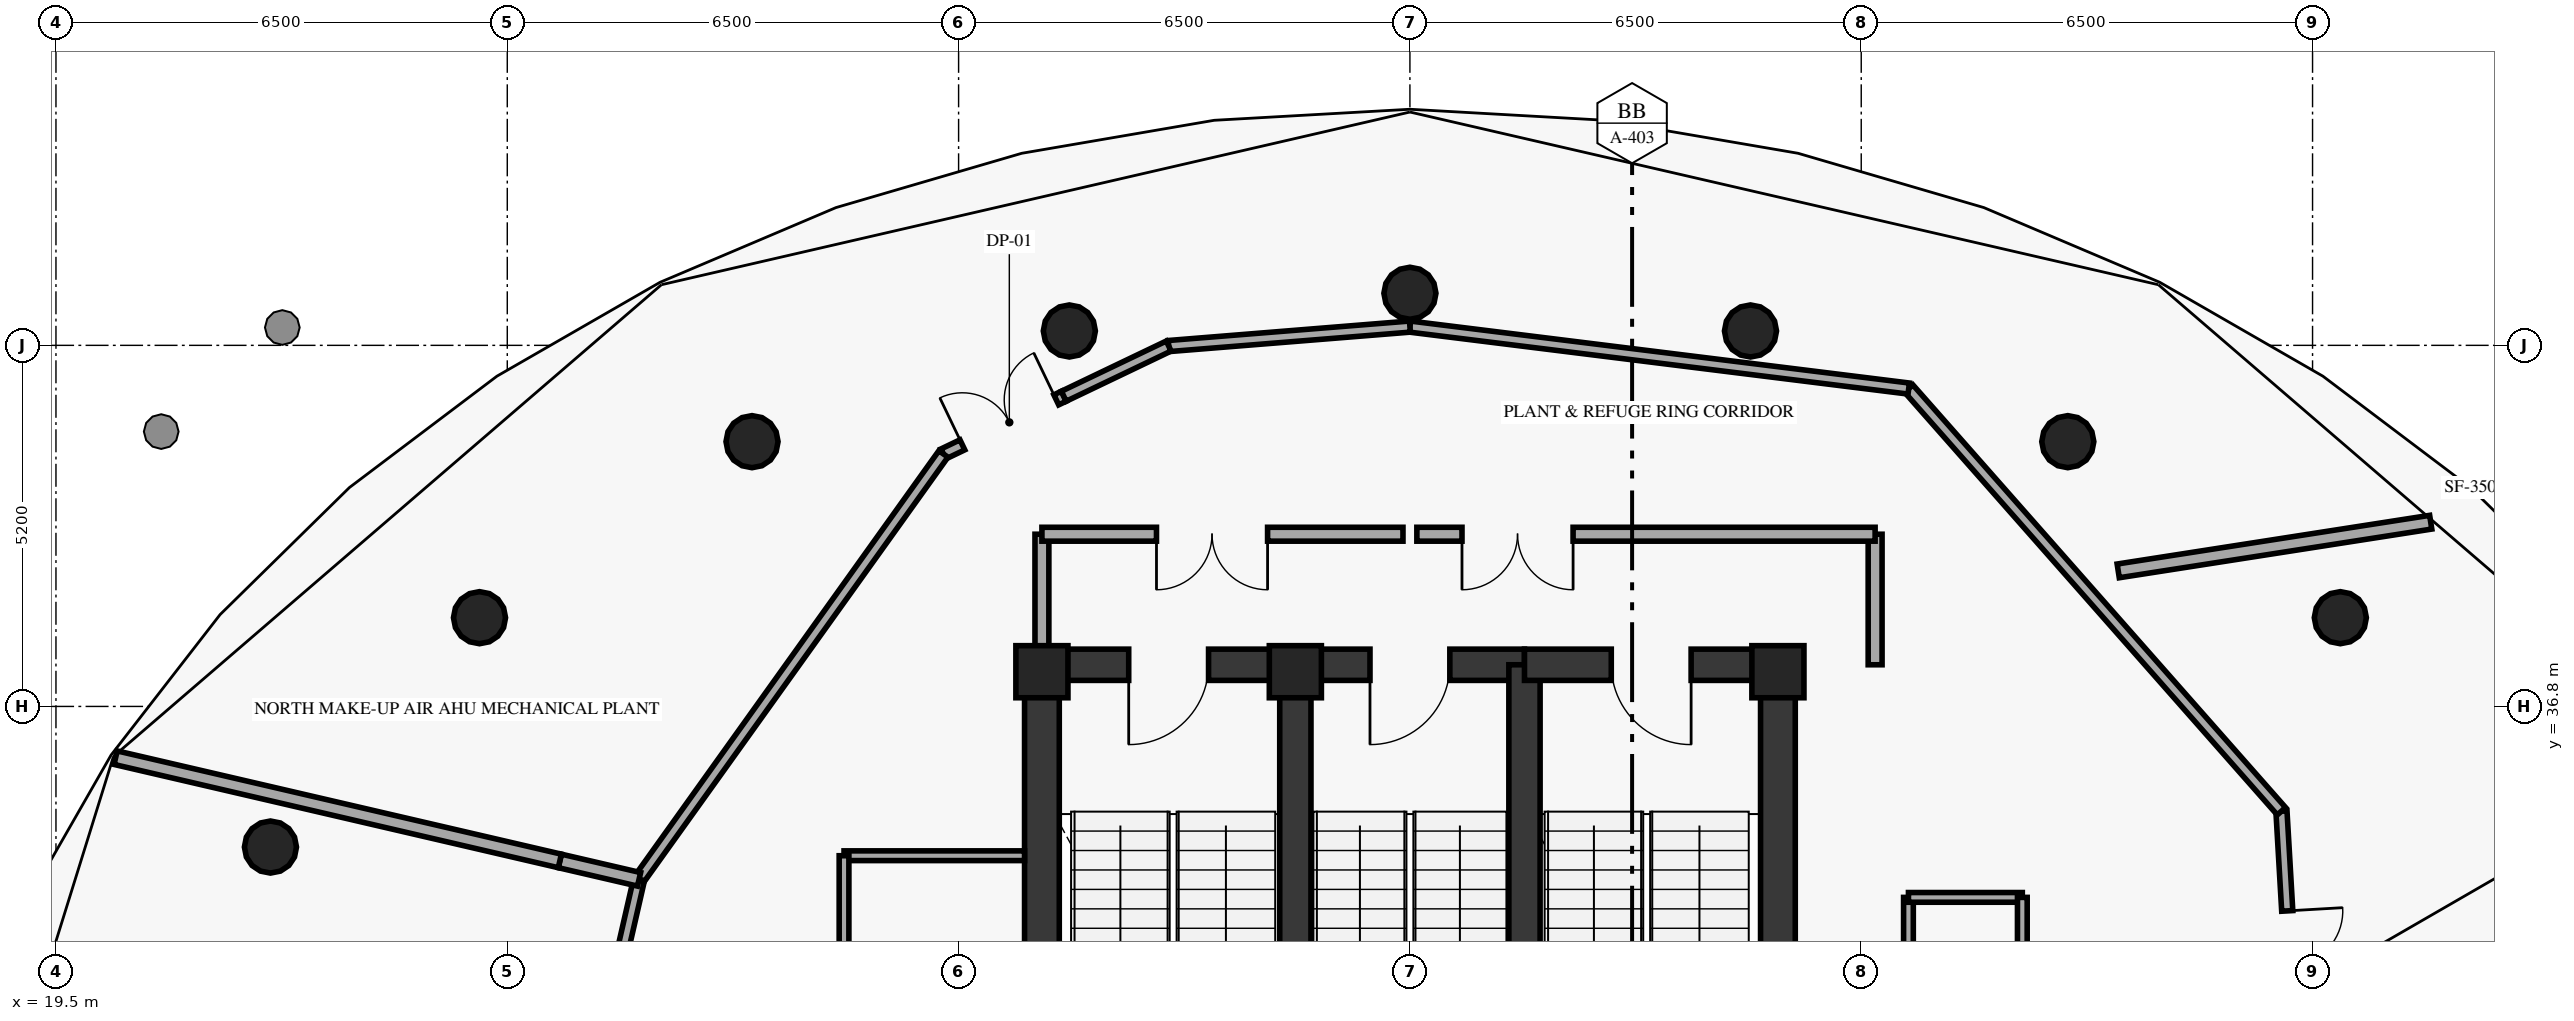
"""IFC4 building model, lengths in metres.
Left out: names, types, materials, properties, quantities, classifications, styles, units other than length and angle.
Written with IfcOpenShell. Run it as: python <this file> out.ifc"""

import sys

from ifc_helpers import new_model, si_unit, direction, frame, frame_2d, origin, origin_2d, place, context, subcontext, project, spatial, rectangle, circle, extrude, element, fill, save


model = new_model("IFC4")
c1 = context("Model", 3, precision=1e-05, world=origin(), true_north=direction((0.0, 1.0)))
c2 = subcontext(c1, "Body", "Model", "MODEL_VIEW")
j1 = project(units=[si_unit("LENGTHUNIT", "METRE"), si_unit("PLANEANGLEUNIT", "RADIAN")], contexts=[c1])
p1 = place(None, origin())
s1 = spatial("IfcSite", under=j1, at=p1, CompositionType="ELEMENT")
p2 = place(p1, origin())
s2 = spatial("IfcBuilding", under=s1, at=p2, CompositionType="ELEMENT")
p3 = place(p2, frame((0.0, 0.0, 301.2)))
s3 = spatial("IfcBuildingStorey", under=s2, at=p3, CompositionType="ELEMENT", Elevation=301.2)
for number, where, z_axis, x_axis in (
    (1, (44.3, 37.3, 0.0), (0.0, 0.0, 1.0), (1.0, 0.0, 0.0)),
    (2, (37.35, 37.3, 0.0), (0.0, 0.0, 1.0), (1.0, 0.0, 0.0)),
    (3, (33.7, 37.3, 0.0), (0.0, 0.0, 1.0), (1.0, 0.0, 0.0)),
):
    element("IfcColumn", number, at=place(p3, frame(where, z_axis=z_axis, x_axis=x_axis)), inside=s3, PredefinedType="PILASTER", context=c2, shape_type="SweptSolid", body=[
        extrude(rectangle(XDim=0.75, YDim=0.75, at=origin_2d()), origin(), (0.0, 0.0, 1.0), 5.25),
    ])
for number, where, z_axis, x_axis in (
    (4, (52.4, 38.078, 0.0), (0.0, 0.0, 1.0), (1.0, 0.0, 0.0)),
    (5, (48.475, 40.613, 0.0), (0.0, 0.0, 1.0), (1.0, 0.0, 0.0)),
    (6, (43.905, 42.207, 0.0), (0.0, 0.0, 1.0), (1.0, 0.0, 0.0)),
    (7, (39.0, 42.75, 0.0), (0.0, 0.0, 1.0), (1.0, 0.0, 0.0)),
    (8, (34.095, 42.207, 0.0), (0.0, 0.0, 1.0), (1.0, 0.0, 0.0)),
    (9, (29.525, 40.613, 0.0), (0.0, 0.0, 1.0), (1.0, 0.0, 0.0)),
    (10, (25.6, 38.078, 0.0), (0.0, 0.0, 1.0), (1.0, 0.0, 0.0)),
    (11, (22.589, 34.775, 0.0), (0.0, 0.0, 1.0), (1.0, 0.0, 0.0)),
):
    element("IfcColumn", number, at=place(p3, frame(where, z_axis=z_axis, x_axis=x_axis)), inside=s3, PredefinedType="COLUMN", context=c2, shape_type="SweptSolid", body=[
        extrude(circle(Radius=0.375, at=origin_2d()), origin(), (0.0, 0.0, 1.0), 5.25),
    ])
for number, where, z_axis, x_axis in (
    (12, (33.7, 29.05, 0.0), (0.0, 0.0, 1.0), (0.0, 1.0, 0.0)),
    (13, (44.3, 29.05, 0.0), (0.0, 0.0, 1.0), (0.0, 1.0, 0.0)),
):
    element("IfcWall", number, at=place(p3, frame(where, z_axis=z_axis, x_axis=x_axis)), inside=s3, PredefinedType="SHEAR", context=c2, shape_type="SweptSolid", body=[
        extrude(rectangle(XDim=8.35, YDim=0.5, at=frame_2d((4.175, 0.0))), origin(), (0.0, 0.0, 1.0), 5.25),
    ])
p4 = place(p3, frame((37.35, 37.4, 0.0), z_axis=(0.0, 0.0, 1.0), x_axis=(-1.0, 0.0, 0.0)))
e14 = element("IfcWall", 14, at=p4, inside=s3, PredefinedType="SHEAR", context=c2, shape_type="SweptSolid", body=[
    extrude(rectangle(XDim=3.65, YDim=0.45, at=frame_2d((1.825, 0.0))), origin(), (0.0, 0.0, 1.0), 5.25),
])
p5 = place(p4, frame((1.25, 0.0, 0.0)))
e15 = element("IfcOpeningElement", 15, at=p5, cuts=e14, PredefinedType="OPENING", context=c2, shape_type="SweptSolid", body=[
    extrude(rectangle(XDim=1.15, YDim=2.15, at=frame_2d((0.575, 1.075))), frame((0.0, 0.235, 0.0), z_axis=(0.0, -1.0, 0.0), x_axis=(1.0, 0.0, 0.0)), (0.0, 0.0, 1.0), 0.47),
])
p6 = place(p3, frame((37.35, 29.05, 0.0), z_axis=(0.0, 0.0, 1.0), x_axis=(0.0, 1.0, 0.0)))
e16 = element("IfcWall", 16, at=p6, inside=s3, PredefinedType="SHEAR", context=c2, shape_type="SweptSolid", body=[
    extrude(rectangle(XDim=8.35, YDim=0.45, at=frame_2d((4.175, 0.0))), origin(), (0.0, 0.0, 1.0), 5.25),
])
p7 = place(p3, frame((40.65, 37.4, 0.0), z_axis=(0.0, 0.0, 1.0), x_axis=(-1.0, 0.0, 0.0)))
e17 = element("IfcWall", 17, at=p7, inside=s3, PredefinedType="SHEAR", context=c2, shape_type="SweptSolid", body=[
    extrude(rectangle(XDim=3.3, YDim=0.45, at=frame_2d((1.65, 0.0))), origin(), (0.0, 0.0, 1.0), 5.25),
])
p8 = place(p7, frame((1.075, 0.0, 0.0)))
e18 = element("IfcOpeningElement", 18, at=p8, cuts=e17, PredefinedType="OPENING", context=c2, shape_type="SweptSolid", body=[
    extrude(rectangle(XDim=1.15, YDim=2.15, at=frame_2d((0.575, 1.075))), frame((0.0, 0.235, 0.0), z_axis=(0.0, -1.0, 0.0), x_axis=(1.0, 0.0, 0.0)), (0.0, 0.0, 1.0), 0.47),
])
p9 = place(p3, frame((40.65, 29.05, 0.0), z_axis=(0.0, 0.0, 1.0), x_axis=(0.0, 1.0, 0.0)))
e19 = element("IfcWall", 19, at=p9, inside=s3, PredefinedType="SHEAR", context=c2, shape_type="SweptSolid", body=[
    extrude(rectangle(XDim=8.35, YDim=0.45, at=frame_2d((4.175, 0.0))), origin(), (0.0, 0.0, 1.0), 5.25),
])
p10 = place(p3, frame((44.3, 37.4, 0.0), z_axis=(0.0, 0.0, 1.0), x_axis=(-1.0, 0.0, 0.0)))
e20 = element("IfcWall", 20, at=p10, inside=s3, PredefinedType="SHEAR", context=c2, shape_type="SweptSolid", body=[
    extrude(rectangle(XDim=3.65, YDim=0.45, at=frame_2d((1.825, 0.0))), origin(), (0.0, 0.0, 1.0), 5.25),
])
p11 = place(p10, frame((1.25, 0.0, 0.0)))
e21 = element("IfcOpeningElement", 21, at=p11, cuts=e20, PredefinedType="OPENING", context=c2, shape_type="SweptSolid", body=[
    extrude(rectangle(XDim=1.15, YDim=2.15, at=frame_2d((0.575, 1.075))), frame((0.0, 0.235, 0.0), z_axis=(0.0, -1.0, 0.0), x_axis=(1.0, 0.0, 0.0)), (0.0, 0.0, 1.0), 0.47),
])
for number, where, z_axis, x_axis in (
    (22, (33.7, 37.4, 0.0), (0.0, 0.0, 1.0), (0.0, 1.0, 0.0)),
    (23, (45.7, 37.4, 0.0), (0.0, 0.0, 1.0), (0.0, 1.0, 0.0)),
):
    element("IfcWall", number, at=place(p3, frame(where, z_axis=z_axis, x_axis=x_axis)), inside=s3, PredefinedType="SOLIDWALL", context=c2, shape_type="SweptSolid", body=[
        extrude(rectangle(XDim=1.88, YDim=0.2, at=frame_2d((0.94, 0.0))), origin(), (0.0, 0.0, 1.0), 5.25),
    ])
p12 = place(p3, frame((38.9, 39.28, 0.0), z_axis=(0.0, 0.0, 1.0), x_axis=(-1.0, 0.0, 0.0)))
e24 = element("IfcWall", 24, at=p12, inside=s3, PredefinedType="SOLIDWALL", context=c2, shape_type="SweptSolid", body=[
    extrude(rectangle(XDim=5.2, YDim=0.2, at=frame_2d((2.6, 0.0))), origin(), (0.0, 0.0, 1.0), 5.25),
])
p13 = place(p12, frame((1.95, 0.0, 0.0)))
e25 = element("IfcOpeningElement", 25, at=p13, cuts=e24, PredefinedType="OPENING", context=c2, shape_type="SweptSolid", body=[
    extrude(rectangle(XDim=1.6, YDim=2.2, at=frame_2d((0.8, 1.1))), frame((0.0, 0.11, 0.0), z_axis=(0.0, -1.0, 0.0), x_axis=(1.0, 0.0, 0.0)), (0.0, 0.0, 1.0), 0.22),
])
p14 = place(p3, frame((45.7, 39.28, 0.0), z_axis=(0.0, 0.0, 1.0), x_axis=(-1.0, 0.0, 0.0)))
e26 = element("IfcWall", 26, at=p14, inside=s3, PredefinedType="SOLIDWALL", context=c2, shape_type="SweptSolid", body=[
    extrude(rectangle(XDim=6.6, YDim=0.2, at=frame_2d((3.3, 0.0))), origin(), (0.0, 0.0, 1.0), 5.25),
])
p15 = place(p14, frame((4.35, 0.0, 0.0)))
e27 = element("IfcOpeningElement", 27, at=p15, cuts=e26, PredefinedType="OPENING", context=c2, shape_type="SweptSolid", body=[
    extrude(rectangle(XDim=1.6, YDim=2.2, at=frame_2d((0.8, 1.1))), frame((0.0, 0.11, 0.0), z_axis=(0.0, -1.0, 0.0), x_axis=(1.0, 0.0, 0.0)), (0.0, 0.0, 1.0), 0.22),
])
p16 = place(p3, frame((30.85, 34.65, 0.0), z_axis=(0.0, 0.0, 1.0), x_axis=(1.0, 0.0, 0.0)))
e28 = element("IfcWall", 28, at=p16, inside=s3, PredefinedType="PARTITIONING", context=c2, shape_type="SweptSolid", body=[
    extrude(rectangle(XDim=2.6, YDim=0.14, at=frame_2d((1.3, 0.0))), origin(), (0.0, 0.0, 1.0), 5.25),
])
p17 = place(p3, frame((30.85, 29.05, 0.0), z_axis=(0.0, 0.0, 1.0), x_axis=(0.0, 1.0, 0.0)))
e29 = element("IfcWall", 29, at=p17, inside=s3, PredefinedType="PARTITIONING", context=c2, shape_type="SweptSolid", body=[
    extrude(rectangle(XDim=5.6, YDim=0.14, at=frame_2d((2.8, 0.0))), origin(), (0.0, 0.0, 1.0), 5.25),
])
p18 = place(p3, frame((46.18, 34.05, 0.0), z_axis=(0.0, 0.0, 1.0), x_axis=(0.0, -1.0, 0.0)))
e30 = element("IfcWall", 30, at=p18, inside=s3, PredefinedType="PARTITIONING", context=c2, shape_type="SweptSolid", body=[
    extrude(rectangle(XDim=5.0, YDim=0.14, at=frame_2d((2.5, 0.0))), origin(), (0.0, 0.0, 1.0), 5.25),
])
p19 = place(p18, frame((2.1, 0.0, 0.0)))
e31 = element("IfcOpeningElement", 31, at=p19, cuts=e30, PredefinedType="OPENING", context=c2, shape_type="SweptSolid", body=[
    extrude(rectangle(XDim=0.8, YDim=2.05, at=frame_2d((0.4, 1.025))), frame((0.0, 0.08, 0.0), z_axis=(0.0, -1.0, 0.0), x_axis=(1.0, 0.0, 0.0)), (0.0, 0.0, 1.0), 0.16),
])
p20 = place(p3, frame((46.18, 34.05, 0.0), z_axis=(0.0, 0.0, 1.0), x_axis=(1.0, 0.0, 0.0)))
e32 = element("IfcWall", 32, at=p20, inside=s3, PredefinedType="PARTITIONING", context=c2, shape_type="SweptSolid", body=[
    extrude(rectangle(XDim=1.64, YDim=0.14, at=frame_2d((0.82, 0.0))), origin(), (0.0, 0.0, 1.0), 5.25),
])
p21 = place(p3, frame((47.82, 29.05, 0.0), z_axis=(0.0, 0.0, 1.0), x_axis=(0.0, 1.0, 0.0)))
e33 = element("IfcWall", 33, at=p21, inside=s3, PredefinedType="PARTITIONING", context=c2, shape_type="SweptSolid", body=[
    extrude(rectangle(XDim=5.0, YDim=0.14, at=frame_2d((2.5, 0.0))), origin(), (0.0, 0.0, 1.0), 5.25),
])
p22 = place(p3, frame((51.552, 35.291, 0.0), z_axis=(0.0, 0.0, 1.0), x_axis=(0.058082602913, -0.998311780577, 0.0)))
e34 = element("IfcWall", 34, at=p22, inside=s3, PredefinedType="PARTITIONING", context=c2, shape_type="SweptSolid", body=[
    extrude(rectangle(XDim=4.477, YDim=0.16, at=frame_2d((2.238, 0.0))), origin(), (0.0, 0.0, 1.0), 5.25),
])
p23 = place(p22, frame((1.438, 0.0, 0.0)))
e35 = element("IfcOpeningElement", 35, at=p23, cuts=e34, PredefinedType="OPENING", context=c2, shape_type="SweptSolid", body=[
    extrude(rectangle(XDim=1.6, YDim=2.2, at=frame_2d((0.8, 1.1))), frame((0.0, 0.09, 0.0), z_axis=(0.0, -1.0, 0.0), x_axis=(1.0, 0.0, 0.0)), (0.0, 0.0, 1.0), 0.18),
])
p24 = place(p3, frame((51.552, 35.291, 0.0), z_axis=(0.0, 0.0, 1.0), x_axis=(-0.661421630005, 0.750014284772, 0.0)))
e36 = element("IfcWall", 36, at=p24, inside=s3, PredefinedType="PARTITIONING", context=c2, shape_type="SweptSolid", body=[
    extrude(rectangle(XDim=8.116, YDim=0.16, at=frame_2d((4.058, 0.0))), origin(), (0.0, 0.0, 1.0), 5.25),
])
p25 = place(p3, frame((46.184, 41.378, 0.0), z_axis=(0.0, 0.0, 1.0), x_axis=(-0.992378204756, 0.12322945559, 0.0)))
e37 = element("IfcWall", 37, at=p25, inside=s3, PredefinedType="PARTITIONING", context=c2, shape_type="SweptSolid", body=[
    extrude(rectangle(XDim=7.239, YDim=0.16, at=frame_2d((3.62, 0.0))), origin(), (0.0, 0.0, 1.0), 5.25),
])
p26 = place(p3, frame((39.0, 42.27, 0.0), z_axis=(0.0, 0.0, 1.0), x_axis=(-0.99676721303, -0.080343780277, 0.0)))
e38 = element("IfcWall", 38, at=p26, inside=s3, PredefinedType="PARTITIONING", context=c2, shape_type="SweptSolid", body=[
    extrude(rectangle(XDim=3.485, YDim=0.16, at=frame_2d((1.743, 0.0))), origin(), (0.0, 0.0, 1.0), 5.25),
])
p27 = place(p3, frame((32.281, 40.436, 0.0), z_axis=(0.0, 0.0, 1.0), x_axis=(0.90176860417, 0.432219139481, 0.0)))
e39 = element("IfcWall", 39, at=p27, inside=s3, PredefinedType="PARTITIONING", context=c2, shape_type="SweptSolid", body=[
    extrude(rectangle(XDim=1.923, YDim=0.16, at=frame_2d((0.961, 0.0))), origin(), (0.0, 0.0, 1.0), 3.8),
])
p28 = place(p27, frame((0.303, 0.0, 0.0)))
e40 = element("IfcOpeningElement", 40, at=p28, cuts=e39, PredefinedType="OPENING", context=c2, shape_type="SweptSolid", body=[
    extrude(rectangle(XDim=1.5, YDim=2.2, at=frame_2d((0.75, 1.1))), frame((0.0, 0.09, 0.0), z_axis=(0.0, -1.0, 0.0), x_axis=(1.0, 0.0, 0.0)), (0.0, 0.0, 1.0), 0.18),
])
p29 = place(p3, frame((34.015, 41.267, 0.0), z_axis=(0.0, 0.0, 1.0), x_axis=(0.902075014366, 0.431579272506, 0.0)))
e41 = element("IfcWall", 41, at=p29, inside=s3, PredefinedType="PARTITIONING", context=c2, shape_type="SweptSolid", body=[
    extrude(rectangle(XDim=1.675, YDim=0.16, at=frame_2d((0.837, 0.0))), origin(), (0.0, 0.0, 1.0), 5.25),
])
p30 = place(p3, frame((32.281, 40.436, 0.0), z_axis=(0.0, 0.0, 1.0), x_axis=(-0.581884927471, -0.813271130179, 0.0)))
e42 = element("IfcWall", 42, at=p30, inside=s3, PredefinedType="PARTITIONING", context=c2, shape_type="SweptSolid", body=[
    extrude(rectangle(XDim=7.532, YDim=0.16, at=frame_2d((3.766, 0.0))), origin(), (0.0, 0.0, 1.0), 5.25),
])
p31 = place(p3, frame((27.898, 34.31, 0.0), z_axis=(0.0, 0.0, 1.0), x_axis=(-0.223002916051, -0.974817777553, 0.0)))
e43 = element("IfcWall", 43, at=p31, inside=s3, PredefinedType="PARTITIONING", context=c2, shape_type="SweptSolid", body=[
    extrude(rectangle(XDim=7.704, YDim=0.16, at=frame_2d((3.852, 0.0))), origin(), (0.0, 0.0, 1.0), 5.25),
])
p32 = place(p3, frame((49.201, 38.752, 0.0), z_axis=(0.0, 0.0, 1.0), x_axis=(0.988090587407, 0.153873295533, 0.0)))
e44 = element("IfcWall", 44, at=p32, inside=s3, PredefinedType="SOLIDWALL", context=c2, shape_type="SweptSolid", body=[
    extrude(rectangle(XDim=4.555, YDim=0.2, at=frame_2d((2.278, 0.0))), origin(), (0.0, 0.0, 1.0), 5.25),
])
p33 = place(p3, frame((27.898, 34.31, 0.0), z_axis=(0.0, 0.0, 1.0), x_axis=(-0.974088180288, 0.226168558873, 0.0)))
e45 = element("IfcWall", 45, at=p33, inside=s3, PredefinedType="SOLIDWALL", context=c2, shape_type="SweptSolid", body=[
    extrude(rectangle(XDim=1.171, YDim=0.2, at=frame_2d((0.585, 0.0))), origin(), (0.0, 0.0, 1.0), 3.45),
])
p34 = place(p3, frame((26.757, 34.575, 0.0), z_axis=(0.0, 0.0, 1.0), x_axis=(-0.974037958158, 0.226384752285, 0.0)))
e46 = element("IfcWall", 46, at=p34, inside=s3, PredefinedType="SOLIDWALL", context=c2, shape_type="SweptSolid", body=[
    extrude(rectangle(XDim=6.569, YDim=0.2, at=frame_2d((3.284, 0.0))), origin(), (0.0, 0.0, 1.0), 5.25),
])
p35 = place(p5, origin())
e47 = element("IfcDoor", 47, at=p35, inside=s3, OperationType="SINGLE_SWING_RIGHT", PredefinedType="DOOR", context=c2, shape_type="SweptSolid", body=[
    extrude(rectangle(XDim=1.15, YDim=2.15, at=frame_2d((0.575, 1.075))), frame((0.0, 0.025, 0.0), z_axis=(0.0, -1.0, 0.0), x_axis=(1.0, 0.0, 0.0)), (0.0, 0.0, 1.0), 0.05),
])
fill(e15, e47)
p36 = place(p8, origin())
e48 = element("IfcDoor", 48, at=p36, inside=s3, OperationType="SINGLE_SWING_RIGHT", PredefinedType="DOOR", context=c2, shape_type="SweptSolid", body=[
    extrude(rectangle(XDim=1.15, YDim=2.15, at=frame_2d((0.575, 1.075))), frame((0.0, 0.025, 0.0), z_axis=(0.0, -1.0, 0.0), x_axis=(1.0, 0.0, 0.0)), (0.0, 0.0, 1.0), 0.05),
])
fill(e18, e48)
p37 = place(p11, origin())
e49 = element("IfcDoor", 49, at=p37, inside=s3, OperationType="SINGLE_SWING_LEFT", PredefinedType="DOOR", context=c2, shape_type="SweptSolid", body=[
    extrude(rectangle(XDim=1.15, YDim=2.15, at=frame_2d((0.575, 1.075))), frame((0.0, 0.025, 0.0), z_axis=(0.0, -1.0, 0.0), x_axis=(1.0, 0.0, 0.0)), (0.0, 0.0, 1.0), 0.05),
])
fill(e21, e49)
p38 = place(p13, origin())
e50 = element("IfcDoor", 50, at=p38, inside=s3, OperationType="DOUBLE_DOOR_SINGLE_SWING", PredefinedType="DOOR", context=c2, shape_type="SweptSolid", body=[
    extrude(rectangle(XDim=1.6, YDim=2.2, at=frame_2d((0.8, 1.1))), frame((0.0, 0.025, 0.0), z_axis=(0.0, -1.0, 0.0), x_axis=(1.0, 0.0, 0.0)), (0.0, 0.0, 1.0), 0.05),
])
fill(e25, e50)
p39 = place(p15, origin())
e51 = element("IfcDoor", 51, at=p39, inside=s3, OperationType="DOUBLE_DOOR_SINGLE_SWING", PredefinedType="DOOR", context=c2, shape_type="SweptSolid", body=[
    extrude(rectangle(XDim=1.6, YDim=2.2, at=frame_2d((0.8, 1.1))), frame((0.0, 0.025, 0.0), z_axis=(0.0, -1.0, 0.0), x_axis=(1.0, 0.0, 0.0)), (0.0, 0.0, 1.0), 0.05),
])
fill(e27, e51)
p40 = place(p23, origin())
e52 = element("IfcDoor", 52, at=p40, inside=s3, OperationType="DOUBLE_DOOR_SINGLE_SWING", PredefinedType="DOOR", context=c2, shape_type="SweptSolid", body=[
    extrude(rectangle(XDim=1.6, YDim=2.2, at=frame_2d((0.8, 1.1))), frame((0.0, 0.025, 0.0), z_axis=(0.0, -1.0, 0.0), x_axis=(1.0, 0.0, 0.0)), (0.0, 0.0, 1.0), 0.05),
])
fill(e35, e52)
p41 = place(p28, origin())
e53 = element("IfcDoor", 53, at=p41, inside=s3, OperationType="DOUBLE_DOOR_SINGLE_SWING", PredefinedType="DOOR", context=c2, shape_type="SweptSolid", body=[
    extrude(rectangle(XDim=1.5, YDim=2.2, at=frame_2d((0.75, 1.1))), frame((0.0, 0.025, 0.0), z_axis=(0.0, -1.0, 0.0), x_axis=(1.0, 0.0, 0.0)), (0.0, 0.0, 1.0), 0.05),
])
fill(e40, e53)
save(model, sys.argv[1])
